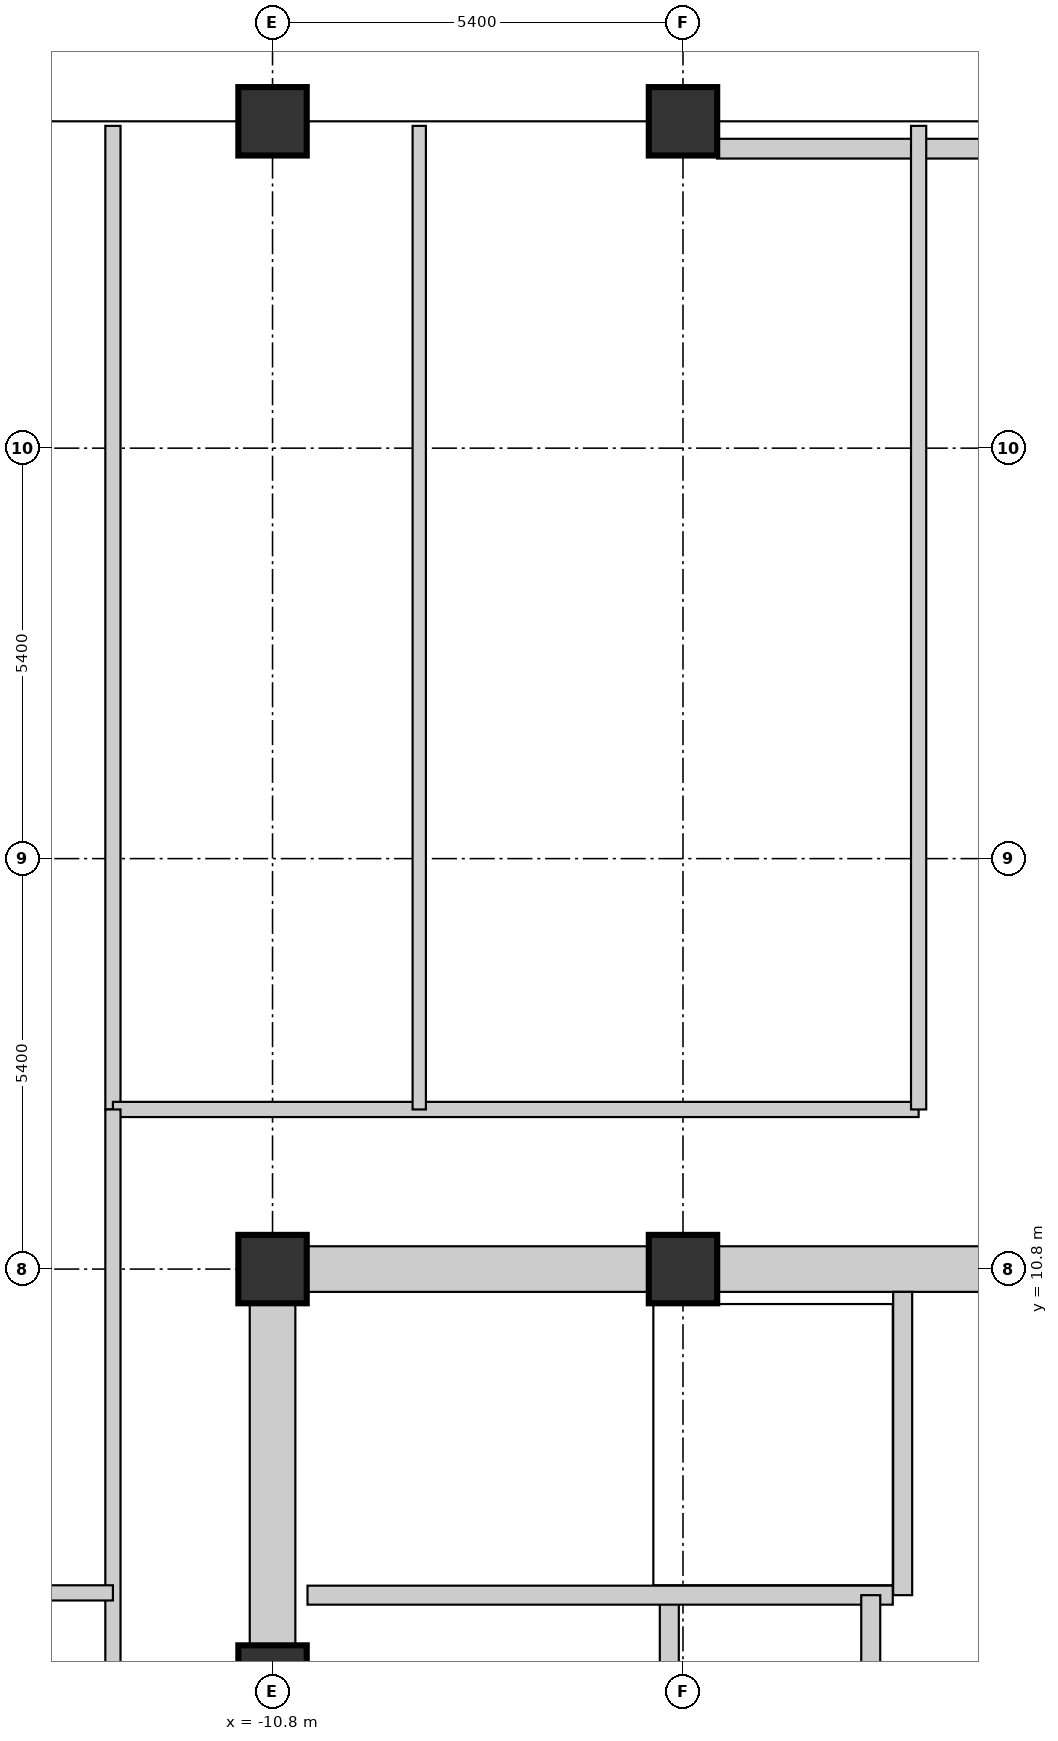
"""IFC4 building model, lengths in metres.
Left out: names, types, materials, properties, quantities, classifications, styles, units other than length and angle.
Written with IfcOpenShell. Run it as: python <this file> out.ifc"""

import sys

from ifc_helpers import new_model, si_unit, direction, frame, frame_2d, origin, origin_2d, place, context, subcontext, project, spatial, rectangle, extrude, element, fill, save


model = new_model("IFC4")
c1 = context("Model", 3, precision=1e-05, world=origin(), true_north=direction((0.0, 1.0)))
c2 = subcontext(c1, "Body", "Model", "MODEL_VIEW")
j1 = project(units=[si_unit("LENGTHUNIT", "METRE"), si_unit("PLANEANGLEUNIT", "RADIAN")], contexts=[c1])
p1 = place(None, origin())
s1 = spatial("IfcSite", under=j1, at=p1, CompositionType="ELEMENT")
p2 = place(p1, origin())
s2 = spatial("IfcBuilding", under=s1, at=p2, CompositionType="ELEMENT")
p3 = place(p2, frame((0.0, 0.0, 174.75)))
s3 = spatial("IfcBuildingStorey", under=s2, at=p3, CompositionType="ELEMENT", Elevation=174.75)
for number, where, z_axis, x_axis in (
    (1, (-10.8, 5.4, 0.0), (0.0, 0.0, 1.0), (1.0, 0.0, 0.0)),
    (2, (-10.8, 10.8, 0.0), (0.0, 0.0, 1.0), (1.0, 0.0, 0.0)),
    (3, (-10.8, 25.9, 0.0), (0.0, 0.0, 1.0), (1.0, 0.0, 0.0)),
    (4, (-5.4, 10.8, 0.0), (0.0, 0.0, 1.0), (1.0, 0.0, 0.0)),
    (5, (-5.4, 25.9, 0.0), (0.0, 0.0, 1.0), (1.0, 0.0, 0.0)),
):
    element("IfcColumn", number, at=place(p3, frame(where, z_axis=z_axis, x_axis=x_axis)), inside=s3, PredefinedType="COLUMN", context=c2, shape_type="SweptSolid", body=[
        extrude(rectangle(XDim=0.9, YDim=0.9, at=origin_2d()), origin(), (0.0, 0.0, 1.0), 3.75),
    ])
p4 = place(p3, frame((-10.34, 10.8, 0.0), z_axis=(0.0, 0.0, 1.0), x_axis=(1.0, 0.0, 0.0)))
e6 = element("IfcWall", 6, at=p4, inside=s3, PredefinedType="SHEAR", context=c2, shape_type="SweptSolid", body=[
    extrude(rectangle(XDim=4.48, YDim=0.6, at=frame_2d((2.24, 0.0))), origin(), (0.0, 0.0, 1.0), 3.75),
])
p5 = place(p3, frame((-4.94, 10.8, 0.0), z_axis=(0.0, 0.0, 1.0), x_axis=(1.0, 0.0, 0.0)))
e7 = element("IfcWall", 7, at=p5, inside=s3, PredefinedType="SHEAR", context=c2, shape_type="SweptSolid", body=[
    extrude(rectangle(XDim=4.48, YDim=0.6, at=frame_2d((2.24, 0.0))), origin(), (0.0, 0.0, 1.0), 3.75),
])
p6 = place(p5, frame((3.13, 0.0, 0.0)))
e8 = element("IfcOpeningElement", 8, at=p6, cuts=e7, PredefinedType="OPENING", context=c2, shape_type="SweptSolid", body=[
    extrude(rectangle(XDim=1.1, YDim=2.1, at=frame_2d((0.55, 1.05))), frame((0.0, 0.31, 0.0), z_axis=(0.0, -1.0, 0.0), x_axis=(1.0, 0.0, 0.0)), (0.0, 0.0, 1.0), 0.62),
])
p7 = place(p3, frame((-10.8, 5.86, 0.0), z_axis=(0.0, 0.0, 1.0), x_axis=(0.0, 1.0, 0.0)))
e9 = element("IfcWall", 9, at=p7, inside=s3, PredefinedType="SHEAR", context=c2, shape_type="SweptSolid", body=[
    extrude(rectangle(XDim=4.48, YDim=0.6, at=frame_2d((2.24, 0.0))), origin(), (0.0, 0.0, 1.0), 3.75),
])
p8 = place(p3, frame((-0.448, 25.54, 0.0), z_axis=(0.0, 0.0, 1.0), x_axis=(-1.0, 0.0, 0.0)))
e10 = element("IfcWall", 10, at=p8, inside=s3, PredefinedType="STANDARD", context=c2, shape_type="SweptSolid", body=[
    extrude(rectangle(XDim=4.504, YDim=0.26, at=frame_2d((2.252, 0.0))), origin(), (0.0, 0.0, 1.0), 2.78),
])
p9 = place(p3, frame((-5.58, 0.72, 0.0), z_axis=(0.0, 0.0, 1.0), x_axis=(0.0, 1.0, 0.0)))
e11 = element("IfcWall", 11, at=p9, inside=s3, PredefinedType="SHEAR", context=c2, shape_type="SweptSolid", body=[
    extrude(rectangle(XDim=5.79, YDim=0.25, at=frame_2d((2.895, 0.0))), origin(), (0.0, 0.0, 1.0), 3.75),
])
p10 = place(p9, frame((3.35, 0.0, 0.0)))
e12 = element("IfcOpeningElement", 12, at=p10, cuts=e11, PredefinedType="OPENING", context=c2, shape_type="SweptSolid", body=[
    extrude(rectangle(XDim=1.1, YDim=2.1, at=frame_2d((0.55, 1.05))), frame((0.0, 0.135, 0.0), z_axis=(0.0, -1.0, 0.0), x_axis=(1.0, 0.0, 0.0)), (0.0, 0.0, 1.0), 0.27),
])
p11 = place(p3, frame((-2.51, 6.51, 0.0), z_axis=(0.0, 0.0, 1.0), x_axis=(0.0, 1.0, 0.0)))
e13 = element("IfcWall", 13, at=p11, inside=s3, PredefinedType="SHEAR", context=c2, shape_type="SweptSolid", body=[
    extrude(rectangle(XDim=3.99, YDim=0.25, at=frame_2d((1.995, 0.0))), origin(), (0.0, 0.0, 1.0), 3.75),
])
p12 = place(p3, frame((-10.34, 6.51, 0.0), z_axis=(0.0, 0.0, 1.0), x_axis=(1.0, 0.0, 0.0)))
e14 = element("IfcWall", 14, at=p12, inside=s3, PredefinedType="SHEAR", context=c2, shape_type="SweptSolid", body=[
    extrude(rectangle(XDim=7.7, YDim=0.25, at=frame_2d((3.85, 0.0))), origin(), (0.0, 0.0, 1.0), 3.75),
])
p13 = place(p12, frame((0.35, 0.0, 0.0)))
e15 = element("IfcOpeningElement", 15, at=p13, cuts=e14, PredefinedType="OPENING", context=c2, shape_type="SweptSolid", body=[
    extrude(rectangle(XDim=1.1, YDim=2.1, at=frame_2d((0.55, 1.05))), frame((0.0, 0.135, 0.0), z_axis=(0.0, -1.0, 0.0), x_axis=(1.0, 0.0, 0.0)), (0.0, 0.0, 1.0), 0.27),
])
p14 = place(p3, frame((-2.93, 0.68, 0.0), z_axis=(0.0, 0.0, 1.0), x_axis=(0.0, 1.0, 0.0)))
e16 = element("IfcWall", 16, at=p14, inside=s3, PredefinedType="SHEAR", context=c2, shape_type="SweptSolid", body=[
    extrude(rectangle(XDim=5.83, YDim=0.25, at=frame_2d((2.915, 0.0))), origin(), (0.0, 0.0, 1.0), 3.75),
])
p15 = place(p14, frame((0.75, 0.0, 0.0)))
e17 = element("IfcOpeningElement", 17, at=p15, cuts=e16, PredefinedType="OPENING", context=c2, shape_type="SweptSolid", body=[
    extrude(rectangle(XDim=1.2, YDim=2.1, at=frame_2d((0.6, 1.05))), frame((0.0, 0.135, 0.0), z_axis=(0.0, -1.0, 0.0), x_axis=(1.0, 0.0, 0.0)), (0.0, 0.0, 1.0), 0.27),
])
p16 = place(p3, frame((-12.9, 12.9, 0.0), z_axis=(0.0, 0.0, 1.0), x_axis=(0.0, 1.0, 0.0)))
e18 = element("IfcWall", 18, at=p16, inside=s3, PredefinedType="PARTITIONING", context=c2, shape_type="SweptSolid", body=[
    extrude(rectangle(XDim=12.94, YDim=0.2, at=frame_2d((6.47, 0.0))), origin(), (0.0, 0.0, 1.0), 2.78),
])
p17 = place(p3, frame((-12.9, 12.9, 0.0), z_axis=(0.0, 0.0, 1.0), x_axis=(1.0, 0.0, 0.0)))
e19 = element("IfcWall", 19, at=p17, inside=s3, PredefinedType="PARTITIONING", context=c2, shape_type="SweptSolid", body=[
    extrude(rectangle(XDim=10.6, YDim=0.2, at=frame_2d((5.3, 0.0))), origin(), (0.0, 0.0, 1.0), 3.006),
])
p18 = place(p17, frame((0.28, 0.0, 0.0)))
e20 = element("IfcOpeningElement", 20, at=p18, cuts=e19, PredefinedType="OPENING", context=c2, shape_type="SweptSolid", body=[
    extrude(rectangle(XDim=0.85, YDim=2.1, at=frame_2d((0.425, 1.05))), frame((0.0, 0.11, 0.0), z_axis=(0.0, -1.0, 0.0), x_axis=(1.0, 0.0, 0.0)), (0.0, 0.0, 1.0), 0.22),
])
p19 = place(p17, frame((4.31, 0.0, 0.0)))
e21 = element("IfcOpeningElement", 21, at=p19, cuts=e19, PredefinedType="OPENING", context=c2, shape_type="SweptSolid", body=[
    extrude(rectangle(XDim=0.85, YDim=2.1, at=frame_2d((0.425, 1.05))), frame((0.0, 0.11, 0.0), z_axis=(0.0, -1.0, 0.0), x_axis=(1.0, 0.0, 0.0)), (0.0, 0.0, 1.0), 0.22),
])
p20 = place(p3, frame((-2.3, 12.9, 0.0), z_axis=(0.0, 0.0, 1.0), x_axis=(0.0, 1.0, 0.0)))
e22 = element("IfcWall", 22, at=p20, inside=s3, PredefinedType="PARTITIONING", context=c2, shape_type="SweptSolid", body=[
    extrude(rectangle(XDim=12.94, YDim=0.2, at=frame_2d((6.47, 0.0))), origin(), (0.0, 0.0, 1.0), 2.78),
])
p21 = place(p3, frame((-12.9, -0.35, 0.0), z_axis=(0.0, 0.0, 1.0), x_axis=(0.0, 1.0, 0.0)))
e23 = element("IfcWall", 23, at=p21, inside=s3, PredefinedType="PARTITIONING", context=c2, shape_type="SweptSolid", body=[
    extrude(rectangle(XDim=13.25, YDim=0.2, at=frame_2d((6.625, 0.0))), origin(), (0.0, 0.0, 1.0), 3.006),
])
p22 = place(p21, frame((1.005, 0.0, 0.0)))
e24 = element("IfcOpeningElement", 24, at=p22, cuts=e23, PredefinedType="OPENING", context=c2, shape_type="SweptSolid", body=[
    extrude(rectangle(XDim=0.85, YDim=2.1, at=frame_2d((0.425, 1.05))), frame((0.0, 0.11, 0.0), z_axis=(0.0, -1.0, 0.0), x_axis=(1.0, 0.0, 0.0)), (0.0, 0.0, 1.0), 0.22),
])
p23 = place(p21, frame((4.45, 0.0, 0.0)))
e25 = element("IfcOpeningElement", 25, at=p23, cuts=e23, PredefinedType="OPENING", context=c2, shape_type="SweptSolid", body=[
    extrude(rectangle(XDim=0.85, YDim=2.1, at=frame_2d((0.425, 1.05))), frame((0.0, 0.11, 0.0), z_axis=(0.0, -1.0, 0.0), x_axis=(1.0, 0.0, 0.0)), (0.0, 0.0, 1.0), 0.22),
])
p24 = place(p21, frame((9.62, 0.0, 0.0)))
e26 = element("IfcOpeningElement", 26, at=p24, cuts=e23, PredefinedType="OPENING", context=c2, shape_type="SweptSolid", body=[
    extrude(rectangle(XDim=0.95, YDim=2.1, at=frame_2d((0.475, 1.05))), frame((0.0, 0.11, 0.0), z_axis=(0.0, -1.0, 0.0), x_axis=(1.0, 0.0, 0.0)), (0.0, 0.0, 1.0), 0.22),
])
p25 = place(p3, frame((-8.87, 12.9, 0.0), z_axis=(0.0, 0.0, 1.0), x_axis=(0.0, 1.0, 0.0)))
e27 = element("IfcWall", 27, at=p25, inside=s3, PredefinedType="PARTITIONING", context=c2, shape_type="SweptSolid", body=[
    extrude(rectangle(XDim=12.94, YDim=0.175, at=frame_2d((6.47, 0.0))), origin(), (0.0, 0.0, 1.0), 2.78),
])
p26 = place(p3, frame((-26.94, 6.54, 0.0), z_axis=(0.0, 0.0, 1.0), x_axis=(1.0, 0.0, 0.0)))
e28 = element("IfcWall", 28, at=p26, inside=s3, PredefinedType="PARTITIONING", context=c2, shape_type="SweptSolid", body=[
    extrude(rectangle(XDim=14.04, YDim=0.2, at=frame_2d((7.02, 0.0))), origin(), (0.0, 0.0, 1.0), 2.78),
])
p27 = place(p13, origin())
e29 = element("IfcDoor", 29, at=p27, inside=s3, OperationType="SINGLE_SWING_LEFT", PredefinedType="DOOR", context=c2, shape_type="SweptSolid", body=[
    extrude(rectangle(XDim=1.1, YDim=2.1, at=frame_2d((0.55, 1.05))), frame((0.0, 0.025, 0.0), z_axis=(0.0, -1.0, 0.0), x_axis=(1.0, 0.0, 0.0)), (0.0, 0.0, 1.0), 0.05),
])
fill(e15, e29)
p28 = place(p6, origin())
e30 = element("IfcDoor", 30, at=p28, inside=s3, OperationType="SINGLE_SWING_LEFT", PredefinedType="DOOR", context=c2, shape_type="SweptSolid", body=[
    extrude(rectangle(XDim=1.1, YDim=2.1, at=frame_2d((0.55, 1.05))), frame((0.0, 0.025, 0.0), z_axis=(0.0, -1.0, 0.0), x_axis=(1.0, 0.0, 0.0)), (0.0, 0.0, 1.0), 0.05),
])
fill(e8, e30)
p29 = place(p24, origin())
e31 = element("IfcDoor", 31, at=p29, inside=s3, OperationType="SINGLE_SWING_RIGHT", PredefinedType="DOOR", context=c2, shape_type="SweptSolid", body=[
    extrude(rectangle(XDim=0.95, YDim=2.1, at=frame_2d((0.475, 1.05))), frame((0.0, 0.025, 0.0), z_axis=(0.0, -1.0, 0.0), x_axis=(1.0, 0.0, 0.0)), (0.0, 0.0, 1.0), 0.05),
])
fill(e26, e31)
p30 = place(p18, origin())
e32 = element("IfcDoor", 32, at=p30, inside=s3, OperationType="SINGLE_SWING_LEFT", PredefinedType="DOOR", context=c2, shape_type="SweptSolid", body=[
    extrude(rectangle(XDim=0.85, YDim=2.1, at=frame_2d((0.425, 1.05))), frame((0.0, 0.025, 0.0), z_axis=(0.0, -1.0, 0.0), x_axis=(1.0, 0.0, 0.0)), (0.0, 0.0, 1.0), 0.05),
])
fill(e20, e32)
p31 = place(p19, origin())
e33 = element("IfcDoor", 33, at=p31, inside=s3, OperationType="SINGLE_SWING_RIGHT", PredefinedType="DOOR", context=c2, shape_type="SweptSolid", body=[
    extrude(rectangle(XDim=0.85, YDim=2.1, at=frame_2d((0.425, 1.05))), frame((0.0, 0.025, 0.0), z_axis=(0.0, -1.0, 0.0), x_axis=(1.0, 0.0, 0.0)), (0.0, 0.0, 1.0), 0.05),
])
fill(e21, e33)
save(model, sys.argv[1])
